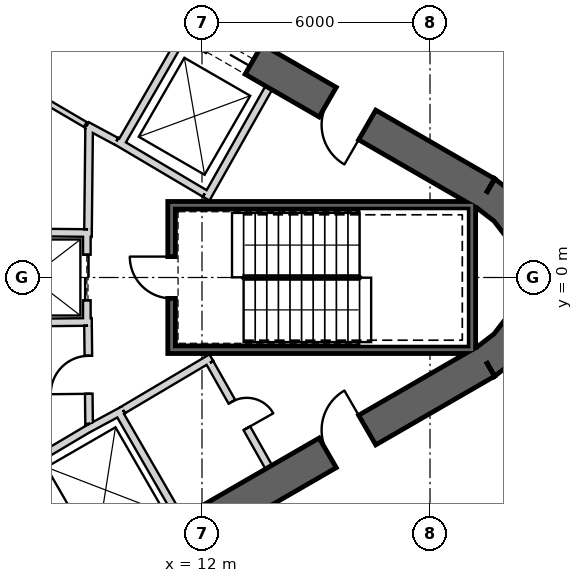
"""IFC4 building model, lengths in metres.
Left out: names, types, materials, properties, quantities, classifications, styles, units other than length and angle.
Written with IfcOpenShell. Run it as: python <this file> out.ifc"""

import sys

from ifc_helpers import new_model, si_unit, direction, frame, frame_2d, origin, place, context, subcontext, project, spatial, polyline, rectangle, outline, extrude, element, fill, save


model = new_model("IFC4")
c1 = context("Model", 3, precision=1e-05, world=origin(), true_north=direction((0.0, 1.0)))
c2 = subcontext(c1, "Body", "Model", "MODEL_VIEW")
j1 = project(units=[si_unit("LENGTHUNIT", "METRE"), si_unit("PLANEANGLEUNIT", "RADIAN")], contexts=[c1])
p1 = place(None, origin())
s1 = spatial("IfcSite", under=j1, at=p1, CompositionType="ELEMENT")
p2 = place(p1, origin())
s2 = spatial("IfcBuilding", under=s1, at=p2, CompositionType="ELEMENT")
p3 = place(p2, frame((0.0, 0.0, 322.1)))
s3 = spatial("IfcBuildingStorey", under=s2, at=p3, CompositionType="ELEMENT", Elevation=322.1)
p4 = place(p3, frame((19.475, 2.208, 0.0), z_axis=(0.0, 0.0, 1.0), x_axis=(-0.866028369851, 0.499994862586, 0.0)))
e1 = element("IfcWall", 1, at=p4, inside=s3, PredefinedType="SHEAR", context=c2, shape_type="SweptSolid", body=[
    extrude(rectangle(XDim=31.523, YDim=0.9, at=frame_2d((15.762, 0.0))), origin(), (0.0, 0.0, 1.0), 3.9),
])
p5 = place(p4, frame((7.062, 0.0, 0.0)))
e2 = element("IfcOpeningElement", 2, at=p5, cuts=e1, PredefinedType="OPENING", context=c2, shape_type="SweptSolid", body=[
    extrude(rectangle(XDim=1.2, YDim=2.4, at=frame_2d((0.6, 1.2))), frame((0.0, 0.46, 0.0), z_axis=(0.0, -1.0, 0.0), x_axis=(1.0, 0.0, 0.0)), (0.0, 0.0, 1.0), 0.92),
])
p6 = place(p4, frame((3.612, 0.0, 0.0)))
e3 = element("IfcOpeningElement", 3, at=p6, cuts=e1, PredefinedType="OPENING", context=c2, shape_type="SweptSolid", body=[
    extrude(rectangle(XDim=1.2, YDim=2.4, at=frame_2d((0.6, 1.2))), frame((0.0, 0.46, 0.0), z_axis=(0.0, -1.0, 0.0), x_axis=(1.0, 0.0, 0.0)), (0.0, 0.0, 1.0), 0.92),
])
p7 = place(p4, frame((26.712, 0.0, 0.0)))
e4 = element("IfcOpeningElement", 4, at=p7, cuts=e1, PredefinedType="OPENING", context=c2, shape_type="SweptSolid", body=[
    extrude(rectangle(XDim=1.2, YDim=2.4, at=frame_2d((0.6, 1.2))), frame((0.0, 0.46, 0.0), z_axis=(0.0, -1.0, 0.0), x_axis=(1.0, 0.0, 0.0)), (0.0, 0.0, 1.0), 0.92),
])
p8 = place(p3, frame((-7.825, -17.97, 0.0), z_axis=(0.0, 0.0, 1.0), x_axis=(0.866028369851, 0.499994862586, 0.0)))
e5 = element("IfcWall", 5, at=p8, inside=s3, PredefinedType="SHEAR", context=c2, shape_type="SweptSolid", body=[
    extrude(rectangle(XDim=31.523, YDim=0.9, at=frame_2d((15.762, 0.0))), origin(), (0.0, 0.0, 1.0), 3.9),
])
p9 = place(p8, frame((17.862, 0.0, 0.0)))
e6 = element("IfcOpeningElement", 6, at=p9, cuts=e5, PredefinedType="OPENING", context=c2, shape_type="SweptSolid", body=[
    extrude(rectangle(XDim=1.2, YDim=2.4, at=frame_2d((0.6, 1.2))), frame((0.0, 0.46, 0.0), z_axis=(0.0, -1.0, 0.0), x_axis=(1.0, 0.0, 0.0)), (0.0, 0.0, 1.0), 0.92),
])
p10 = place(p8, frame((20.562, 0.0, 0.0)))
e7 = element("IfcOpeningElement", 7, at=p10, cuts=e5, PredefinedType="OPENING", context=c2, shape_type="SweptSolid", body=[
    extrude(rectangle(XDim=1.2, YDim=2.4, at=frame_2d((0.6, 1.2))), frame((0.0, 0.46, 0.0), z_axis=(0.0, -1.0, 0.0), x_axis=(1.0, 0.0, 0.0)), (0.0, 0.0, 1.0), 0.92),
])
p11 = place(p8, frame((26.712, 0.0, 0.0)))
e8 = element("IfcOpeningElement", 8, at=p11, cuts=e5, PredefinedType="OPENING", context=c2, shape_type="SweptSolid", body=[
    extrude(rectangle(XDim=1.2, YDim=2.4, at=frame_2d((0.6, 1.2))), frame((0.0, 0.46, 0.0), z_axis=(0.0, -1.0, 0.0), x_axis=(1.0, 0.0, 0.0)), (0.0, 0.0, 1.0), 0.92),
])
p12 = place(p8, frame((3.612, 0.0, 0.0)))
e9 = element("IfcOpeningElement", 9, at=p12, cuts=e5, PredefinedType="OPENING", context=c2, shape_type="SweptSolid", body=[
    extrude(rectangle(XDim=1.2, YDim=2.4, at=frame_2d((0.6, 1.2))), frame((0.0, 0.46, 0.0), z_axis=(0.0, -1.0, 0.0), x_axis=(1.0, 0.0, 0.0)), (0.0, 0.0, 1.0), 0.92),
])
p13 = place(p3, origin())
e10 = element("IfcWall", 10, at=p13, inside=s3, PredefinedType="SHEAR", context=c2, shape_type="SweptSolid", body=[
    extrude(outline(polyline([(19.7, -2.598), (20.321, -2.121), (20.798, -1.5), (21.098, -0.777), (21.2, 0.0), (21.098, 0.777), (20.798, 1.5), (20.321, 2.121), (19.7, 2.598), (19.25, 1.819), (19.685, 1.485), (20.019, 1.05), (20.229, 0.543), (20.3, 0.0), (20.229, -0.543), (20.019, -1.05), (19.685, -1.485), (19.25, -1.819), (19.7, -2.598)])), origin(), (0.0, 0.0, 1.0), 3.9),
])
p14 = place(p3, frame((9.847, 3.495, 0.0), z_axis=(0.0, 0.0, 1.0), x_axis=(0.499984717929, 0.866034226713, 0.0)))
e11 = element("IfcWall", 11, at=p14, inside=s3, PredefinedType="PLUMBINGWALL", context=c2, shape_type="SweptSolid", body=[
    extrude(rectangle(XDim=3.25, YDim=0.2, at=frame_2d((1.625, 0.0))), origin(), (0.0, 0.0, 1.0), 3.6),
])
p15 = place(p3, frame((12.11, 2.073, 0.0), z_axis=(0.0, 0.0, 1.0), x_axis=(0.49196600604, 0.870614408852, 0.0)))
e12 = element("IfcWall", 12, at=p15, inside=s3, PredefinedType="PLUMBINGWALL", context=c2, shape_type="SweptSolid", body=[
    extrude(rectangle(XDim=3.35, YDim=0.2, at=frame_2d((1.675, 0.0))), origin(), (0.0, 0.0, 1.0), 3.6),
])
p16 = place(p3, frame((12.073, 2.211, 0.0), z_axis=(0.0, 0.0, 1.0), x_axis=(-0.860414880418, 0.509594185166, 0.0)))
e13 = element("IfcWall", 13, at=p16, inside=s3, PredefinedType="PLUMBINGWALL", context=c2, shape_type="SweptSolid", body=[
    extrude(rectangle(XDim=2.7, YDim=0.2, at=frame_2d((1.35, 0.0))), origin(), (0.0, 0.0, 1.0), 3.6),
])
p17 = place(p3, frame((9.795, -3.525, 0.0), z_axis=(0.0, 0.0, 1.0), x_axis=(0.499984717929, -0.866034226713, 0.0)))
e14 = element("IfcWall", 14, at=p17, inside=s3, PredefinedType="PLUMBINGWALL", context=c2, shape_type="SweptSolid", body=[
    extrude(rectangle(XDim=3.25, YDim=0.2, at=frame_2d((1.625, 0.0))), origin(), (0.0, 0.0, 1.0), 3.6),
])
p18 = place(p3, frame((8.974, -3.999, 0.0), z_axis=(0.0, 0.0, 1.0), x_axis=(0.880907015104, 0.473289373154, 0.0)))
e15 = element("IfcWall", 15, at=p18, inside=s3, PredefinedType="PLUMBINGWALL", context=c2, shape_type="SweptSolid", body=[
    extrude(rectangle(XDim=1.078, YDim=0.2, at=frame_2d((0.539, 0.0))), origin(), (0.0, 0.0, 1.0), 3.6),
])
p19 = place(p3, frame((7.493, -4.878, 0.0), z_axis=(0.0, 0.0, 1.0), x_axis=(0.859981807212, 0.510324691999, 0.0)))
e16 = element("IfcWall", 16, at=p19, inside=s3, PredefinedType="PLUMBINGWALL", context=c2, shape_type="SweptSolid", body=[
    extrude(rectangle(XDim=1.845, YDim=0.2, at=frame_2d((0.922, 0.0))), origin(), (0.0, 0.0, 1.0), 3.6),
])
p20 = place(p3, frame((19.2, 1.9, -0.3), z_axis=(0.0, 0.0, 1.0), x_axis=(-1.0, 0.0, 0.0)))
e17 = element("IfcWall", 17, at=p20, inside=s3, PredefinedType="SHEAR", context=c2, shape_type="SweptSolid", body=[
    extrude(rectangle(XDim=8.1, YDim=0.2, at=frame_2d((4.05, 0.0))), origin(), (0.0, 0.0, 1.0), 3.9),
])
p21 = place(p3, frame((19.1, -2.0, -0.3), z_axis=(0.0, 0.0, 1.0), x_axis=(0.0, 1.0, 0.0)))
e18 = element("IfcWall", 18, at=p21, inside=s3, PredefinedType="SHEAR", context=c2, shape_type="SweptSolid", body=[
    extrude(rectangle(XDim=3.8, YDim=0.2, at=frame_2d((1.9, 0.0))), origin(), (0.0, 0.0, 1.0), 3.9),
])
p22 = place(p3, frame((11.1, -1.9, -0.3), z_axis=(0.0, 0.0, 1.0), x_axis=(1.0, 0.0, 0.0)))
e19 = element("IfcWall", 19, at=p22, inside=s3, PredefinedType="SHEAR", context=c2, shape_type="SweptSolid", body=[
    extrude(rectangle(XDim=7.9, YDim=0.2, at=frame_2d((3.95, 0.0))), origin(), (0.0, 0.0, 1.0), 3.9),
])
p23 = place(p3, frame((11.2, -1.8, -0.3), z_axis=(0.0, 0.0, 1.0), x_axis=(0.0, 1.0, 0.0)))
e20 = element("IfcWall", 20, at=p23, inside=s3, PredefinedType="SHEAR", context=c2, shape_type="SweptSolid", body=[
    extrude(rectangle(XDim=3.6, YDim=0.2, at=frame_2d((1.8, 0.0))), origin(), (0.0, 0.0, 1.0), 3.9),
])
p24 = place(p23, frame((1.25, 0.0, 0.3)))
e21 = element("IfcOpeningElement", 21, at=p24, cuts=e20, PredefinedType="OPENING", context=c2, shape_type="SweptSolid", body=[
    extrude(rectangle(XDim=1.1, YDim=2.1, at=frame_2d((0.55, 1.05))), frame((0.0, 0.11, 0.0), z_axis=(0.0, -1.0, 0.0), x_axis=(1.0, 0.0, 0.0)), (0.0, 0.0, 1.0), 0.22),
])
p25 = place(p3, frame((8.97, 1.2, 0.0), z_axis=(0.0, 0.0, 1.0), x_axis=(0.0, -1.0, 0.0)))
e22 = element("IfcWall", 22, at=p25, inside=s3, PredefinedType="PLUMBINGWALL", context=c2, shape_type="SweptSolid", body=[
    extrude(rectangle(XDim=2.4, YDim=0.2, at=frame_2d((1.2, 0.0))), origin(), (0.0, 0.0, 1.0), 3.6),
])
p26 = place(p25, frame((0.6, 0.0, 0.0)))
e23 = element("IfcOpeningElement", 23, at=p26, cuts=e22, PredefinedType="OPENING", context=c2, shape_type="SweptSolid", body=[
    extrude(rectangle(XDim=1.2, YDim=2.4, at=frame_2d((0.6, 1.2))), frame((0.0, 0.11, 0.0), z_axis=(0.0, -1.0, 0.0), x_axis=(1.0, 0.0, 0.0)), (0.0, 0.0, 1.0), 0.22),
])
p27 = place(p3, frame((6.0, 1.2, 0.0), z_axis=(0.0, 0.0, 1.0), x_axis=(0.999949988, -0.010001074852, 0.0)))
e24 = element("IfcWall", 24, at=p27, inside=s3, PredefinedType="PLUMBINGWALL", context=c2, shape_type="SweptSolid", body=[
    extrude(rectangle(XDim=3.1, YDim=0.2, at=frame_2d((1.55, 0.0))), origin(), (0.0, 0.0, 1.0), 3.6),
])
p28 = place(p3, frame((5.9, -1.201, 0.0), z_axis=(0.0, 0.0, 1.0), x_axis=(0.999950064753, 0.009993397809, 0.0)))
e25 = element("IfcWall", 25, at=p28, inside=s3, PredefinedType="PLUMBINGWALL", context=c2, shape_type="SweptSolid", body=[
    extrude(rectangle(XDim=3.2, YDim=0.2, at=frame_2d((1.6, 0.0))), origin(), (0.0, 0.0, 1.0), 3.6),
])
p29 = place(p3, frame((8.974, 3.999, 0.0), z_axis=(0.0, 0.0, 1.0), x_axis=(0.880917147855, -0.473270513147, 0.0)))
e26 = element("IfcWall", 26, at=p29, inside=s3, PredefinedType="PARTITIONING", context=c2, shape_type="SweptSolid", body=[
    extrude(rectangle(XDim=0.878, YDim=0.2, at=frame_2d((0.439, 0.0))), origin(), (0.0, 0.0, 1.0), 3.6),
])
p30 = place(p3, frame((8.931, 4.025, 0.0), z_axis=(0.0, 0.0, 1.0), x_axis=(-0.862666884027, 0.505772525157, 0.0)))
e27 = element("IfcWall", 27, at=p30, inside=s3, PredefinedType="PLUMBINGWALL", context=c2, shape_type="SweptSolid", body=[
    extrude(rectangle(XDim=4.372, YDim=0.15, at=frame_2d((2.186, 0.0))), origin(), (0.0, 0.0, 1.0), 3.6),
])
p31 = place(p3, frame((12.245, -2.109, 0.0), z_axis=(0.0, 0.0, 1.0), x_axis=(-0.860414880418, -0.509594185166, 0.0)))
e28 = element("IfcWall", 28, at=p31, inside=s3, PredefinedType="PARTITIONING", context=c2, shape_type="SweptSolid", body=[
    extrude(rectangle(XDim=2.7, YDim=0.2, at=frame_2d((1.35, 0.0))), origin(), (0.0, 0.0, 1.0), 3.6),
])
p32 = place(p3, frame((13.758, -4.99, 0.0), z_axis=(0.0, 0.0, 1.0), x_axis=(-0.491993409184, 0.87059892334, 0.0)))
e29 = element("IfcWall", 29, at=p32, inside=s3, PredefinedType="PARTITIONING", context=c2, shape_type="SweptSolid", body=[
    extrude(rectangle(XDim=3.15, YDim=0.2, at=frame_2d((1.575, 0.0))), origin(), (0.0, 0.0, 1.0), 3.6),
])
p33 = place(p32, frame((1.175, 0.0, 0.0)))
e30 = element("IfcOpeningElement", 30, at=p33, cuts=e29, PredefinedType="OPENING", context=c2, shape_type="SweptSolid", body=[
    extrude(rectangle(XDim=0.8, YDim=2.1, at=frame_2d((0.4, 1.05))), frame((0.0, 0.11, 0.0), z_axis=(0.0, -1.0, 0.0), x_axis=(1.0, 0.0, 0.0)), (0.0, 0.0, 1.0), 0.22),
])
p34 = place(p3, frame((9.001, 1.27, 0.0), z_axis=(0.0, 0.0, 1.0), x_axis=(0.01074821465, 0.999942236273, 0.0)))
e31 = element("IfcWall", 31, at=p34, inside=s3, PredefinedType="PARTITIONING", context=c2, shape_type="SweptSolid", body=[
    extrude(rectangle(XDim=2.726, YDim=0.2, at=frame_2d((1.363, 0.0))), origin(), (0.0, 0.0, 1.0), 3.6),
])
p35 = place(p3, frame((9.029, -3.851, 0.0), z_axis=(0.0, 0.0, 1.0), x_axis=(-0.010783593937, 0.99994185536, 0.0)))
e32 = element("IfcWall", 32, at=p35, inside=s3, PredefinedType="PARTITIONING", context=c2, shape_type="SweptSolid", body=[
    extrude(rectangle(XDim=2.581, YDim=0.2, at=frame_2d((1.291, 0.0))), origin(), (0.0, 0.0, 1.0), 3.6),
])
p36 = place(p35, frame((0.791, 0.0, 0.0)))
e33 = element("IfcOpeningElement", 33, at=p36, cuts=e32, PredefinedType="OPENING", context=c2, shape_type="SweptSolid", body=[
    extrude(rectangle(XDim=1.0, YDim=2.1, at=frame_2d((0.5, 1.05))), frame((0.0, 0.11, 0.0), z_axis=(0.0, -1.0, 0.0), x_axis=(1.0, 0.0, 0.0)), (0.0, 0.0, 1.0), 0.22),
])
p37 = place(p3, frame((22.074, 5.153, 0.0), z_axis=(0.0, 0.0, 1.0), x_axis=(-0.866023485483, 0.500003322581, 0.0)))
e34 = element("IfcWall", 34, at=p37, inside=s3, PredefinedType="PARTITIONING", context=c2, shape_type="SweptSolid", body=[
    extrude(rectangle(XDim=32.881, YDim=0.2, at=frame_2d((16.44, 0.0))), origin(), (0.0, 0.0, 1.0), 2.97),
])
p38 = place(p37, frame((28.249, 0.0, 0.0)))
e35 = element("IfcOpeningElement", 35, at=p38, cuts=e34, PredefinedType="OPENING", context=c2, shape_type="SweptSolid", body=[
    extrude(rectangle(XDim=1.0, YDim=2.1, at=frame_2d((0.5, 1.05))), frame((0.0, 0.11, 0.0), z_axis=(0.0, -1.0, 0.0), x_axis=(1.0, 0.0, 0.0)), (0.0, 0.0, 1.0), 0.22),
])
p39 = place(p37, frame((16.387, 0.0, 0.0)))
e36 = element("IfcOpeningElement", 36, at=p39, cuts=e34, PredefinedType="OPENING", context=c2, shape_type="SweptSolid", body=[
    extrude(rectangle(XDim=1.0, YDim=2.1, at=frame_2d((0.5, 1.05))), frame((0.0, 0.11, 0.0), z_axis=(0.0, -1.0, 0.0), x_axis=(1.0, 0.0, 0.0)), (0.0, 0.0, 1.0), 0.22),
])
p40 = place(p37, frame((4.128, 0.0, 0.0)))
e37 = element("IfcOpeningElement", 37, at=p40, cuts=e34, PredefinedType="OPENING", context=c2, shape_type="SweptSolid", body=[
    extrude(rectangle(XDim=1.0, YDim=2.1, at=frame_2d((0.5, 1.05))), frame((0.0, 0.11, 0.0), z_axis=(0.0, -1.0, 0.0), x_axis=(1.0, 0.0, 0.0)), (0.0, 0.0, 1.0), 0.22),
])
p41 = place(p3, frame((-6.505, -21.885, 0.0), z_axis=(0.0, 0.0, 1.0), x_axis=(0.86602457258, 0.500001439686, 0.0)))
e38 = element("IfcWall", 38, at=p41, inside=s3, PredefinedType="PARTITIONING", context=c2, shape_type="SweptSolid", body=[
    extrude(rectangle(XDim=32.952, YDim=0.2, at=frame_2d((16.476, 0.0))), origin(), (0.0, 0.0, 1.0), 2.97),
])
p42 = place(p41, frame((20.569, 0.0, 0.0)))
e39 = element("IfcOpeningElement", 39, at=p42, cuts=e38, PredefinedType="OPENING", context=c2, shape_type="SweptSolid", body=[
    extrude(rectangle(XDim=1.0, YDim=2.1, at=frame_2d((0.5, 1.05))), frame((0.0, 0.11, 0.0), z_axis=(0.0, -1.0, 0.0), x_axis=(1.0, 0.0, 0.0)), (0.0, 0.0, 1.0), 0.22),
])
p43 = place(p41, frame((4.143, 0.0, 0.0)))
e40 = element("IfcOpeningElement", 40, at=p43, cuts=e38, PredefinedType="OPENING", context=c2, shape_type="SweptSolid", body=[
    extrude(rectangle(XDim=1.0, YDim=2.1, at=frame_2d((0.5, 1.05))), frame((0.0, 0.11, 0.0), z_axis=(0.0, -1.0, 0.0), x_axis=(1.0, 0.0, 0.0)), (0.0, 0.0, 1.0), 0.22),
])
p44 = place(p24, origin())
e41 = element("IfcDoor", 41, at=p44, inside=s3, OperationType="SINGLE_SWING_LEFT", PredefinedType="USERDEFINED", context=c2, shape_type="SweptSolid", body=[
    extrude(rectangle(XDim=1.1, YDim=2.1, at=frame_2d((0.55, 1.05))), frame((0.0, 0.025, 0.0), z_axis=(0.0, -1.0, 0.0), x_axis=(1.0, 0.0, 0.0)), (0.0, 0.0, 1.0), 0.05),
])
fill(e21, e41)
p45 = place(p36, origin())
e42 = element("IfcDoor", 42, at=p45, inside=s3, OperationType="SINGLE_SWING_RIGHT", PredefinedType="USERDEFINED", context=c2, shape_type="SweptSolid", body=[
    extrude(rectangle(XDim=1.0, YDim=2.1, at=frame_2d((0.5, 1.05))), frame((0.0, 0.025, 0.0), z_axis=(0.0, -1.0, 0.0), x_axis=(1.0, 0.0, 0.0)), (0.0, 0.0, 1.0), 0.05),
])
fill(e33, e42)
p46 = place(p26, origin())
e43 = element("IfcDoor", 43, at=p46, inside=s3, OperationType="SLIDING_TO_LEFT", PredefinedType="USERDEFINED", context=c2, shape_type="SweptSolid", body=[
    extrude(rectangle(XDim=1.2, YDim=2.4, at=frame_2d((0.6, 1.2))), frame((0.0, 0.025, 0.0), z_axis=(0.0, -1.0, 0.0), x_axis=(1.0, 0.0, 0.0)), (0.0, 0.0, 1.0), 0.05),
])
fill(e23, e43)
p47 = place(p33, origin())
e44 = element("IfcDoor", 44, at=p47, inside=s3, OperationType="SINGLE_SWING_LEFT", PredefinedType="USERDEFINED", context=c2, shape_type="SweptSolid", body=[
    extrude(rectangle(XDim=0.8, YDim=2.1, at=frame_2d((0.4, 1.05))), frame((0.0, 0.025, 0.0), z_axis=(0.0, -1.0, 0.0), x_axis=(1.0, 0.0, 0.0)), (0.0, 0.0, 1.0), 0.05),
])
fill(e30, e44)
p48 = place(p5, origin())
e45 = element("IfcDoor", 45, at=p48, inside=s3, OperationType="SLIDING_TO_LEFT", PredefinedType="USERDEFINED", context=c2, shape_type="SweptSolid", body=[
    extrude(rectangle(XDim=1.2, YDim=2.4, at=frame_2d((0.6, 1.2))), frame((0.0, 0.025, 0.0), z_axis=(0.0, -1.0, 0.0), x_axis=(1.0, 0.0, 0.0)), (0.0, 0.0, 1.0), 0.05),
])
fill(e2, e45)
p49 = place(p11, origin())
e46 = element("IfcDoor", 46, at=p49, inside=s3, OperationType="SINGLE_SWING_LEFT", PredefinedType="USERDEFINED", context=c2, shape_type="SweptSolid", body=[
    extrude(rectangle(XDim=1.2, YDim=2.4, at=frame_2d((0.6, 1.2))), frame((0.0, 0.025, 0.0), z_axis=(0.0, -1.0, 0.0), x_axis=(1.0, 0.0, 0.0)), (0.0, 0.0, 1.0), 0.05),
])
fill(e8, e46)
p50 = place(p6, origin())
e47 = element("IfcDoor", 47, at=p50, inside=s3, OperationType="SINGLE_SWING_LEFT", PredefinedType="USERDEFINED", context=c2, shape_type="SweptSolid", body=[
    extrude(rectangle(XDim=1.2, YDim=2.4, at=frame_2d((0.6, 1.2))), frame((0.0, 0.025, 0.0), z_axis=(0.0, -1.0, 0.0), x_axis=(1.0, 0.0, 0.0)), (0.0, 0.0, 1.0), 0.05),
])
fill(e3, e47)
save(model, sys.argv[1])
